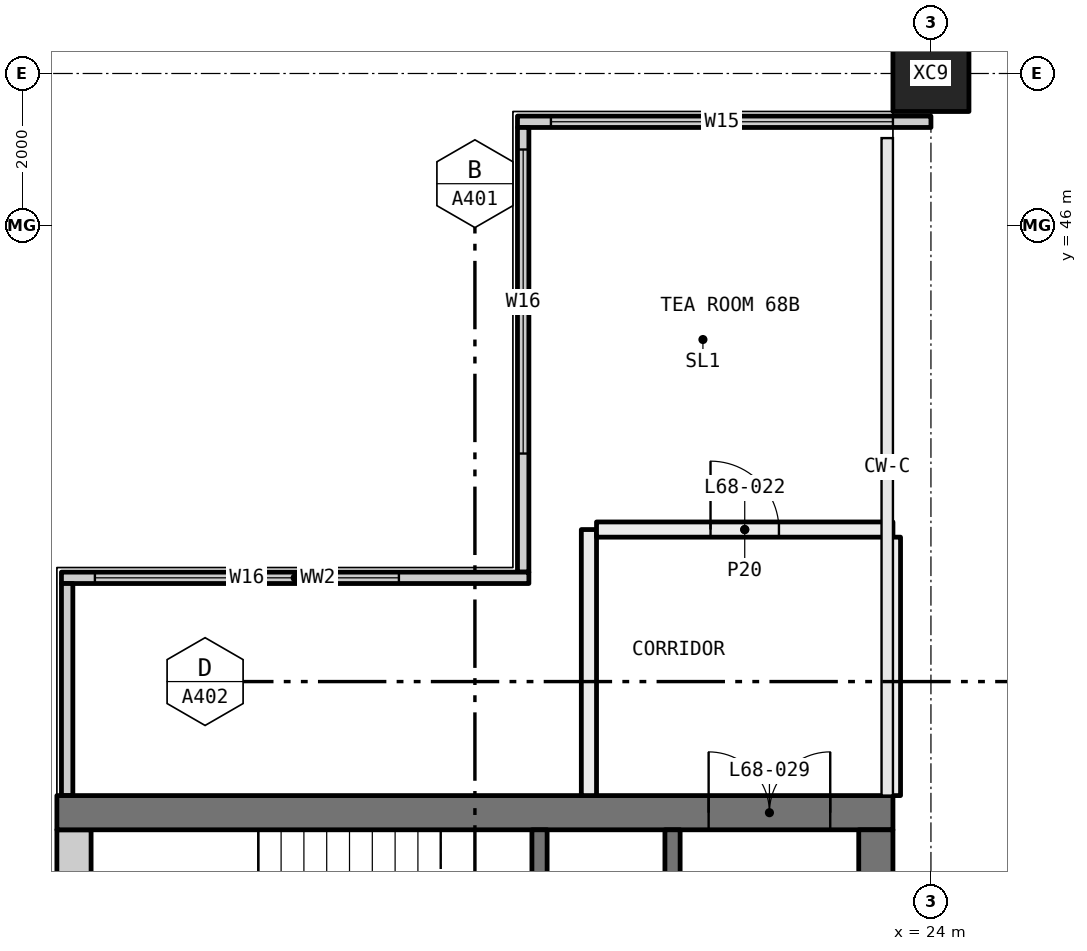
"""IFC4 building model, lengths in metres.
Left out: names, types, materials, properties, quantities, classifications, styles, units other than length and angle.
Written with IfcOpenShell. Run it as: python <this file> out.ifc"""

import sys

from ifc_helpers import new_model, si_unit, direction, frame, frame_2d, origin, origin_2d, place, context, subcontext, project, spatial, rectangle, hollow_rectangle, extrude, element, fill, save


model = new_model("IFC4")
c1 = context("Model", 3, precision=1e-05, world=origin(), true_north=direction((0.0, 1.0)))
c2 = subcontext(c1, "Body", "Model", "MODEL_VIEW")
j1 = project(units=[si_unit("LENGTHUNIT", "METRE"), si_unit("PLANEANGLEUNIT", "RADIAN")], contexts=[c1])
p1 = place(None, origin())
s1 = spatial("IfcSite", under=j1, at=p1, CompositionType="ELEMENT")
p2 = place(p1, origin())
s2 = spatial("IfcBuilding", under=s1, at=p2, CompositionType="ELEMENT")
p3 = place(p2, frame((0.0, 0.0, 252.45)))
s3 = spatial("IfcBuildingStorey", under=s2, at=p3, CompositionType="ELEMENT", Elevation=252.45)
p4 = place(p3, frame((24.0, 48.0, -0.4), z_axis=(0.0, 0.0, 1.0), x_axis=(1.0, 0.0, 0.0)))
e1 = element("IfcColumn", 1, at=p4, inside=s3, PredefinedType="COLUMN", context=c2, shape_type="SweptSolid", body=[
    extrude(hollow_rectangle(XDim=1.0, YDim=1.0, WallThickness=0.036, at=origin_2d()), origin(), (0.0, 0.0, 1.0), 3.45),
])
p5 = place(p3, frame((18.56, 47.365, 0.0), z_axis=(0.0, 0.0, 1.0), x_axis=(1.0, 0.0, 0.0)))
e2 = element("IfcWall", 2, at=p5, inside=s3, PredefinedType="ELEMENTEDWALL", context=c2, shape_type="SweptSolid", body=[
    extrude(rectangle(XDim=5.44, YDim=0.15, at=frame_2d((2.72, 0.0))), origin(), (0.0, 0.0, 1.0), 3.05),
])
p6 = place(p5, frame((0.44, 0.0, 0.45)))
e3 = element("IfcOpeningElement", 3, at=p6, cuts=e2, PredefinedType="OPENING", context=c2, shape_type="SweptSolid", body=[
    extrude(rectangle(XDim=4.5, YDim=2.55, at=frame_2d((2.25, 1.275))), frame((0.0, 0.085, 0.0), z_axis=(0.0, -1.0, 0.0), x_axis=(1.0, 0.0, 0.0)), (0.0, 0.0, 1.0), 0.17),
])
p7 = place(p3, frame((18.635, 41.44, 0.0), z_axis=(0.0, 0.0, 1.0), x_axis=(0.0, 1.0, 0.0)))
e4 = element("IfcWall", 4, at=p7, inside=s3, PredefinedType="ELEMENTEDWALL", context=c2, shape_type="SweptSolid", body=[
    extrude(rectangle(XDim=5.85, YDim=0.15, at=frame_2d((2.925, 0.0))), origin(), (0.0, 0.0, 1.0), 3.05),
])
p8 = place(p7, frame((1.56, 0.0, 0.45)))
e5 = element("IfcOpeningElement", 5, at=p8, cuts=e4, PredefinedType="OPENING", context=c2, shape_type="SweptSolid", body=[
    extrude(rectangle(XDim=4.0, YDim=2.55, at=frame_2d((2.0, 1.275))), frame((0.0, 0.085, 0.0), z_axis=(0.0, -1.0, 0.0), x_axis=(1.0, 0.0, 0.0)), (0.0, 0.0, 1.0), 0.17),
])
p9 = place(p3, frame((12.56, 41.365, 0.0), z_axis=(0.0, 0.0, 1.0), x_axis=(1.0, 0.0, 0.0)))
e6 = element("IfcWall", 6, at=p9, inside=s3, PredefinedType="ELEMENTEDWALL", context=c2, shape_type="SweptSolid", body=[
    extrude(rectangle(XDim=6.15, YDim=0.15, at=frame_2d((3.075, 0.0))), origin(), (0.0, 0.0, 1.0), 3.05),
])
p10 = place(p9, frame((0.44, 0.0, 0.45)))
e7 = element("IfcOpeningElement", 7, at=p10, cuts=e6, PredefinedType="OPENING", context=c2, shape_type="SweptSolid", body=[
    extrude(rectangle(XDim=4.0, YDim=2.55, at=frame_2d((2.0, 1.275))), frame((0.0, 0.085, 0.0), z_axis=(0.0, -1.0, 0.0), x_axis=(1.0, 0.0, 0.0)), (0.0, 0.0, 1.0), 0.17),
])
p11 = place(p3, frame((12.635, 38.5, 0.0), z_axis=(0.0, 0.0, 1.0), x_axis=(0.0, 1.0, 0.0)))
e8 = element("IfcWall", 8, at=p11, inside=s3, PredefinedType="ELEMENTEDWALL", context=c2, shape_type="SweptSolid", body=[
    extrude(rectangle(XDim=2.79, YDim=0.15, at=frame_2d((1.395, 0.0))), origin(), (0.0, 0.0, 1.0), 3.05),
])
p12 = place(p3, frame((19.5, 38.5, 0.0), z_axis=(0.0, 0.0, 1.0), x_axis=(0.0, 1.0, 0.0)))
e9 = element("IfcWall", 9, at=p12, inside=s3, PredefinedType="PARTITIONING", context=c2, shape_type="SweptSolid", body=[
    extrude(rectangle(XDim=3.5, YDim=0.2, at=frame_2d((1.75, 0.0))), origin(), (0.0, 0.0, 1.0), 3.05),
])
p13 = place(p3, frame((19.6, 42.0, 0.0), z_axis=(0.0, 0.0, 1.0), x_axis=(1.0, 0.0, 0.0)))
e10 = element("IfcWall", 10, at=p13, inside=s3, PredefinedType="PARTITIONING", context=c2, shape_type="SweptSolid", body=[
    extrude(rectangle(XDim=3.9, YDim=0.2, at=frame_2d((1.95, 0.0))), origin(), (0.0, 0.0, 1.0), 3.05),
])
p14 = place(p13, frame((1.5, 0.0, 0.0)))
e11 = element("IfcOpeningElement", 11, at=p14, cuts=e10, PredefinedType="OPENING", context=c2, shape_type="SweptSolid", body=[
    extrude(rectangle(XDim=0.9, YDim=2.1, at=frame_2d((0.45, 1.05))), frame((0.0, 0.11, 0.0), z_axis=(0.0, -1.0, 0.0), x_axis=(1.0, 0.0, 0.0)), (0.0, 0.0, 1.0), 0.22),
])
p15 = place(p3, frame((23.5, 41.9, 0.0), z_axis=(0.0, 0.0, 1.0), x_axis=(0.0, -1.0, 0.0)))
e12 = element("IfcWall", 12, at=p15, inside=s3, PredefinedType="PARTITIONING", context=c2, shape_type="SweptSolid", body=[
    extrude(rectangle(XDim=3.4, YDim=0.2, at=frame_2d((1.7, 0.0))), origin(), (0.0, 0.0, 1.0), 3.05),
])
p16 = place(p3, frame((12.5, 38.275, 0.0), z_axis=(0.0, 0.0, 1.0), x_axis=(1.0, 0.0, 0.0)))
e13 = element("IfcWall", 13, at=p16, inside=s3, PredefinedType="SHEAR", context=c2, shape_type="SweptSolid", body=[
    extrude(rectangle(XDim=11.0, YDim=0.45, at=frame_2d((5.5, 0.0))), origin(), (0.0, 0.0, 1.0), 3.05),
])
p17 = place(p16, frame((8.575, 0.0, 0.0)))
e14 = element("IfcOpeningElement", 14, at=p17, cuts=e13, PredefinedType="OPENING", context=c2, shape_type="SweptSolid", body=[
    extrude(rectangle(XDim=1.6, YDim=2.1, at=frame_2d((0.8, 1.05))), frame((0.0, 0.235, 0.0), z_axis=(0.0, -1.0, 0.0), x_axis=(1.0, 0.0, 0.0)), (0.0, 0.0, 1.0), 0.47),
])
for number, where, z_axis, x_axis in (
    (15, (12.725, 21.95, 0.0), (0.0, 0.0, 1.0), (0.0, 1.0, 0.0)),
    (16, (23.275, 21.95, 0.0), (0.0, 0.0, 1.0), (0.0, 1.0, 0.0)),
):
    element("IfcWall", number, at=place(p3, frame(where, z_axis=z_axis, x_axis=x_axis)), inside=s3, PredefinedType="SHEAR", context=c2, shape_type="SweptSolid", body=[
        extrude(rectangle(XDim=16.1, YDim=0.45, at=frame_2d((8.05, 0.0))), origin(), (0.0, 0.0, 1.0), 3.05),
    ])
p18 = place(p3, frame((20.6, 25.1, 0.0), z_axis=(0.0, 0.0, 1.0), x_axis=(0.0, 1.0, 0.0)))
e17 = element("IfcWall", 17, at=p18, inside=s3, PredefinedType="SOLIDWALL", context=c2, shape_type="SweptSolid", body=[
    extrude(rectangle(XDim=12.95, YDim=0.2, at=frame_2d((6.475, 0.0))), origin(), (0.0, 0.0, 1.0), 3.05),
])
p19 = place(p18, frame((0.6, 0.0, 0.0)))
e18 = element("IfcOpeningElement", 18, at=p19, cuts=e17, PredefinedType="OPENING", context=c2, shape_type="SweptSolid", body=[
    extrude(rectangle(XDim=1.1, YDim=2.1, at=frame_2d((0.55, 1.05))), frame((0.0, 0.11, 0.0), z_axis=(0.0, -1.0, 0.0), x_axis=(1.0, 0.0, 0.0)), (0.0, 0.0, 1.0), 0.22),
])
p20 = place(p18, frame((3.1, 0.0, 0.0)))
e19 = element("IfcOpeningElement", 19, at=p20, cuts=e17, PredefinedType="OPENING", context=c2, shape_type="SweptSolid", body=[
    extrude(rectangle(XDim=1.1, YDim=2.1, at=frame_2d((0.55, 1.05))), frame((0.0, 0.11, 0.0), z_axis=(0.0, -1.0, 0.0), x_axis=(1.0, 0.0, 0.0)), (0.0, 0.0, 1.0), 0.22),
])
p21 = place(p18, frame((5.6, 0.0, 0.0)))
e20 = element("IfcOpeningElement", 20, at=p21, cuts=e17, PredefinedType="OPENING", context=c2, shape_type="SweptSolid", body=[
    extrude(rectangle(XDim=1.1, YDim=2.1, at=frame_2d((0.55, 1.05))), frame((0.0, 0.11, 0.0), z_axis=(0.0, -1.0, 0.0), x_axis=(1.0, 0.0, 0.0)), (0.0, 0.0, 1.0), 0.22),
])
p22 = place(p18, frame((8.1, 0.0, 0.0)))
e21 = element("IfcOpeningElement", 21, at=p22, cuts=e17, PredefinedType="OPENING", context=c2, shape_type="SweptSolid", body=[
    extrude(rectangle(XDim=1.1, YDim=2.1, at=frame_2d((0.55, 1.05))), frame((0.0, 0.11, 0.0), z_axis=(0.0, -1.0, 0.0), x_axis=(1.0, 0.0, 0.0)), (0.0, 0.0, 1.0), 0.22),
])
p23 = place(p18, frame((10.975, 0.0, 0.0)))
e22 = element("IfcOpeningElement", 22, at=p23, cuts=e17, PredefinedType="OPENING", context=c2, shape_type="SweptSolid", body=[
    extrude(rectangle(XDim=1.0, YDim=2.1, at=frame_2d((0.5, 1.05))), frame((0.0, 0.11, 0.0), z_axis=(0.0, -1.0, 0.0), x_axis=(1.0, 0.0, 0.0)), (0.0, 0.0, 1.0), 0.22),
])
p24 = place(p3, frame((18.85, 35.1, 0.0), z_axis=(0.0, 0.0, 1.0), x_axis=(0.0, 1.0, 0.0)))
e23 = element("IfcWall", 23, at=p24, inside=s3, PredefinedType="SOLIDWALL", context=c2, shape_type="SweptSolid", body=[
    extrude(rectangle(XDim=2.95, YDim=0.2, at=frame_2d((1.475, 0.0))), origin(), (0.0, 0.0, 1.0), 3.05),
])
p25 = place(p24, frame((0.975, 0.0, 0.0)))
e24 = element("IfcOpeningElement", 24, at=p25, cuts=e23, PredefinedType="OPENING", context=c2, shape_type="SweptSolid", body=[
    extrude(rectangle(XDim=1.0, YDim=2.1, at=frame_2d((0.5, 1.05))), frame((0.0, 0.11, 0.0), z_axis=(0.0, -1.0, 0.0), x_axis=(1.0, 0.0, 0.0)), (0.0, 0.0, 1.0), 0.22),
])
p26 = place(p6, origin())
e25 = element("IfcWindow", 25, at=p26, inside=s3, PartitioningType="SINGLE_PANEL", PredefinedType="WINDOW", context=c2, shape_type="SweptSolid", body=[
    extrude(rectangle(XDim=4.5, YDim=2.55, at=frame_2d((2.25, 1.275))), frame((0.0, 0.03, 0.0), z_axis=(0.0, -1.0, 0.0), x_axis=(1.0, 0.0, 0.0)), (0.0, 0.0, 1.0), 0.06),
])
fill(e3, e25)
p27 = place(p8, origin())
e26 = element("IfcWindow", 26, at=p27, inside=s3, PartitioningType="SINGLE_PANEL", PredefinedType="WINDOW", context=c2, shape_type="SweptSolid", body=[
    extrude(rectangle(XDim=4.0, YDim=2.55, at=frame_2d((2.0, 1.275))), frame((0.0, 0.03, 0.0), z_axis=(0.0, -1.0, 0.0), x_axis=(1.0, 0.0, 0.0)), (0.0, 0.0, 1.0), 0.06),
])
fill(e5, e26)
p28 = place(p10, origin())
e27 = element("IfcWindow", 27, at=p28, inside=s3, PartitioningType="SINGLE_PANEL", PredefinedType="WINDOW", context=c2, shape_type="SweptSolid", body=[
    extrude(rectangle(XDim=4.0, YDim=2.55, at=frame_2d((2.0, 1.275))), frame((0.0, 0.03, 0.0), z_axis=(0.0, -1.0, 0.0), x_axis=(1.0, 0.0, 0.0)), (0.0, 0.0, 1.0), 0.06),
])
fill(e7, e27)
p29 = place(p14, origin())
e28 = element("IfcDoor", 28, at=p29, inside=s3, OperationType="SINGLE_SWING_RIGHT", PredefinedType="DOOR", context=c2, shape_type="SweptSolid", body=[
    extrude(rectangle(XDim=0.9, YDim=2.1, at=frame_2d((0.45, 1.05))), frame((0.0, 0.025, 0.0), z_axis=(0.0, -1.0, 0.0), x_axis=(1.0, 0.0, 0.0)), (0.0, 0.0, 1.0), 0.05),
])
fill(e11, e28)
p30 = place(p17, origin())
e29 = element("IfcDoor", 29, at=p30, inside=s3, OperationType="DOUBLE_DOOR_SINGLE_SWING", PredefinedType="DOOR", context=c2, shape_type="SweptSolid", body=[
    extrude(rectangle(XDim=1.6, YDim=2.1, at=frame_2d((0.8, 1.05))), frame((0.0, 0.025, 0.0), z_axis=(0.0, -1.0, 0.0), x_axis=(1.0, 0.0, 0.0)), (0.0, 0.0, 1.0), 0.05),
])
fill(e14, e29)
save(model, sys.argv[1])
